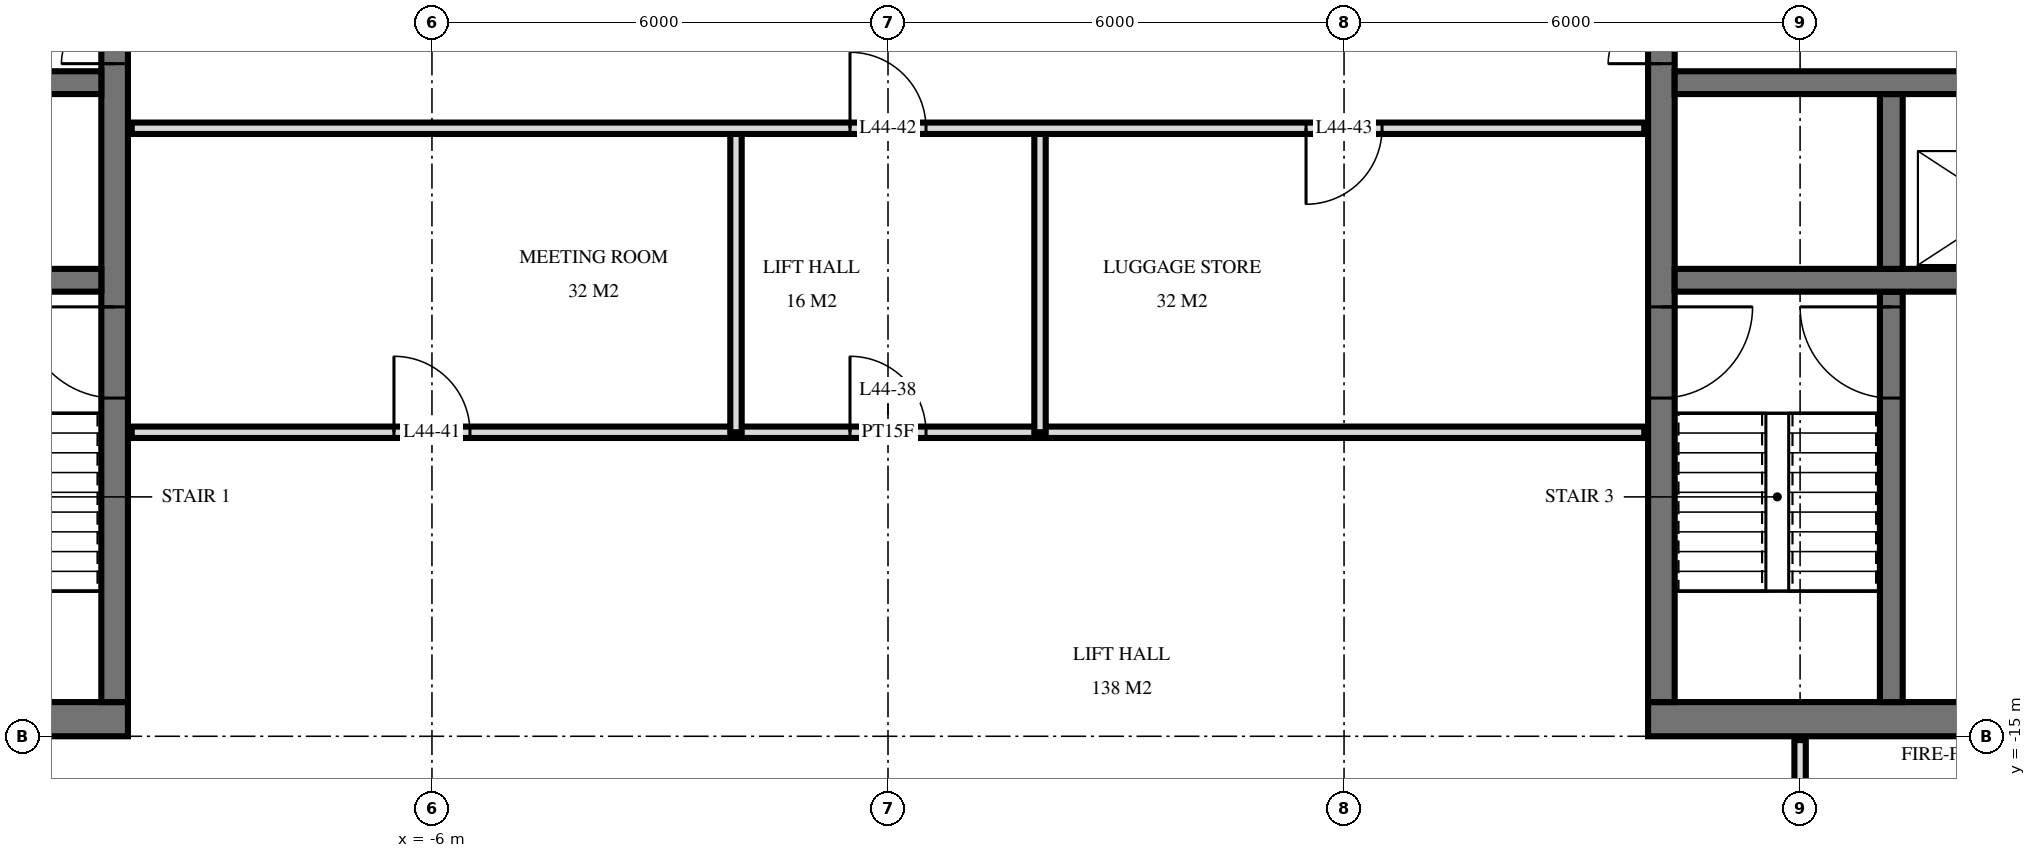
"""IFC4 building model, lengths in metres.
Left out: names, types, materials, properties, quantities, classifications, styles, units other than length and angle.
Written with IfcOpenShell. Run it as: python <this file> out.ifc"""

import sys

from ifc_helpers import new_model, si_unit, direction, frame, frame_2d, origin, place, context, subcontext, project, spatial, rectangle, extrude, element, fill, save


model = new_model("IFC4")
c1 = context("Model", 3, precision=1e-05, world=origin(), true_north=direction((0.0, 1.0)))
c2 = subcontext(c1, "Body", "Model", "MODEL_VIEW")
j1 = project(units=[si_unit("LENGTHUNIT", "METRE"), si_unit("PLANEANGLEUNIT", "RADIAN")], contexts=[c1])
p1 = place(None, origin())
s1 = spatial("IfcSite", under=j1, at=p1, CompositionType="ELEMENT")
p2 = place(p1, origin())
s2 = spatial("IfcBuilding", under=s1, at=p2, CompositionType="ELEMENT")
p3 = place(p2, frame((0.0, 0.0, 170.4)))
s3 = spatial("IfcBuildingStorey", under=s2, at=p3, CompositionType="ELEMENT", Elevation=170.4)
p4 = place(p3, frame((-24.5, -14.775, 0.0), z_axis=(0.0, 0.0, 1.0), x_axis=(1.0, 0.0, 0.0)))
e1 = element("IfcWall", 1, at=p4, inside=s3, PredefinedType="SHEAR", context=c2, shape_type="SweptSolid", body=[
    extrude(rectangle(XDim=14.5, YDim=0.45, at=frame_2d((7.25, 0.0))), origin(), (0.0, 0.0, 1.0), 3.6),
])
p5 = place(p4, frame((6.2, 0.0, 0.0)))
e2 = element("IfcOpeningElement", 2, at=p5, cuts=e1, PredefinedType="OPENING", context=c2, shape_type="SweptSolid", body=[
    extrude(rectangle(XDim=1.2, YDim=2.1, at=frame_2d((0.6, 1.05))), frame((0.0, 0.235, 0.0), z_axis=(0.0, -1.0, 0.0), x_axis=(1.0, 0.0, 0.0)), (0.0, 0.0, 1.0), 0.47),
])
p6 = place(p4, frame((9.25, 0.0, 0.0)))
e3 = element("IfcOpeningElement", 3, at=p6, cuts=e1, PredefinedType="OPENING", context=c2, shape_type="SweptSolid", body=[
    extrude(rectangle(XDim=1.1, YDim=2.1, at=frame_2d((0.55, 1.05))), frame((0.0, 0.235, 0.0), z_axis=(0.0, -1.0, 0.0), x_axis=(1.0, 0.0, 0.0)), (0.0, 0.0, 1.0), 0.47),
])
p7 = place(p4, frame((3.5, 0.0, 0.0)))
e4 = element("IfcOpeningElement", 4, at=p7, cuts=e1, PredefinedType="OPENING", context=c2, shape_type="SweptSolid", body=[
    extrude(rectangle(XDim=0.9, YDim=2.1, at=frame_2d((0.45, 1.05))), frame((0.0, 0.235, 0.0), z_axis=(0.0, -1.0, 0.0), x_axis=(1.0, 0.0, 0.0)), (0.0, 0.0, 1.0), 0.47),
])
p8 = place(p4, frame((1.05, 0.0, 0.0)))
e5 = element("IfcOpeningElement", 5, at=p8, cuts=e1, PredefinedType="OPENING", context=c2, shape_type="SweptSolid", body=[
    extrude(rectangle(XDim=1.0, YDim=2.1, at=frame_2d((0.5, 1.05))), frame((0.0, 0.235, 0.0), z_axis=(0.0, -1.0, 0.0), x_axis=(1.0, 0.0, 0.0)), (0.0, 0.0, 1.0), 0.47),
])
p9 = place(p3, frame((-10.175, -14.55, 0.0), z_axis=(0.0, 0.0, 1.0), x_axis=(0.0, 1.0, 0.0)))
e6 = element("IfcWall", 6, at=p9, inside=s3, PredefinedType="SHEAR", context=c2, shape_type="SweptSolid", body=[
    extrude(rectangle(XDim=14.1, YDim=0.35, at=frame_2d((7.05, 0.0))), origin(), (0.0, 0.0, 1.0), 3.6),
])
p10 = place(p9, frame((8.4, 0.0, 0.0)))
e7 = element("IfcOpeningElement", 7, at=p10, cuts=e6, PredefinedType="OPENING", context=c2, shape_type="SweptSolid", body=[
    extrude(rectangle(XDim=1.4, YDim=2.4, at=frame_2d((0.7, 1.2))), frame((0.0, 0.185, 0.0), z_axis=(0.0, -1.0, 0.0), x_axis=(1.0, 0.0, 0.0)), (0.0, 0.0, 1.0), 0.37),
])
p11 = place(p9, frame((10.0, 0.0, 0.0)))
e8 = element("IfcOpeningElement", 8, at=p11, cuts=e6, PredefinedType="OPENING", context=c2, shape_type="SweptSolid", body=[
    extrude(rectangle(XDim=1.4, YDim=2.4, at=frame_2d((0.7, 1.2))), frame((0.0, 0.185, 0.0), z_axis=(0.0, -1.0, 0.0), x_axis=(1.0, 0.0, 0.0)), (0.0, 0.0, 1.0), 0.37),
])
p12 = place(p9, frame((4.0, 0.0, 0.0)))
e9 = element("IfcOpeningElement", 9, at=p12, cuts=e6, PredefinedType="OPENING", context=c2, shape_type="SweptSolid", body=[
    extrude(rectangle(XDim=1.2, YDim=2.1, at=frame_2d((0.6, 1.05))), frame((0.0, 0.185, 0.0), z_axis=(0.0, -1.0, 0.0), x_axis=(1.0, 0.0, 0.0)), (0.0, 0.0, 1.0), 0.37),
])
p13 = place(p3, frame((-24.05, -6.4, 0.0), z_axis=(0.0, 0.0, 1.0), x_axis=(1.0, 0.0, 0.0)))
e10 = element("IfcWall", 10, at=p13, inside=s3, PredefinedType="SHEAR", context=c2, shape_type="SweptSolid", body=[
    extrude(rectangle(XDim=13.7, YDim=0.3, at=frame_2d((6.85, 0.0))), origin(), (0.0, 0.0, 1.0), 3.6),
])
p14 = place(p13, frame((0.55, 0.0, 0.0)))
e11 = element("IfcOpeningElement", 11, at=p14, cuts=e10, PredefinedType="OPENING", context=c2, shape_type="SweptSolid", body=[
    extrude(rectangle(XDim=1.1, YDim=2.1, at=frame_2d((0.55, 1.05))), frame((0.0, 0.16, 0.0), z_axis=(0.0, -1.0, 0.0), x_axis=(1.0, 0.0, 0.0)), (0.0, 0.0, 1.0), 0.32),
])
p15 = place(p13, frame((5.8, 0.0, 0.0)))
e12 = element("IfcOpeningElement", 12, at=p15, cuts=e10, PredefinedType="OPENING", context=c2, shape_type="SweptSolid", body=[
    extrude(rectangle(XDim=1.1, YDim=2.1, at=frame_2d((0.55, 1.05))), frame((0.0, 0.16, 0.0), z_axis=(0.0, -1.0, 0.0), x_axis=(1.0, 0.0, 0.0)), (0.0, 0.0, 1.0), 0.32),
])
p16 = place(p3, frame((-24.05, -9.0, 0.0), z_axis=(0.0, 0.0, 1.0), x_axis=(1.0, 0.0, 0.0)))
e13 = element("IfcWall", 13, at=p16, inside=s3, PredefinedType="SHEAR", context=c2, shape_type="SweptSolid", body=[
    extrude(rectangle(XDim=13.7, YDim=0.3, at=frame_2d((6.85, 0.0))), origin(), (0.0, 0.0, 1.0), 3.6),
])
p17 = place(p16, frame((8.8, 0.0, 0.0)))
e14 = element("IfcOpeningElement", 14, at=p17, cuts=e13, PredefinedType="OPENING", context=c2, shape_type="SweptSolid", body=[
    extrude(rectangle(XDim=1.1, YDim=2.1, at=frame_2d((0.55, 1.05))), frame((0.0, 0.16, 0.0), z_axis=(0.0, -1.0, 0.0), x_axis=(1.0, 0.0, 0.0)), (0.0, 0.0, 1.0), 0.32),
])
p18 = place(p3, frame((10.0, -14.775, 0.0), z_axis=(0.0, 0.0, 1.0), x_axis=(1.0, 0.0, 0.0)))
e15 = element("IfcWall", 15, at=p18, inside=s3, PredefinedType="SHEAR", context=c2, shape_type="SweptSolid", body=[
    extrude(rectangle(XDim=14.5, YDim=0.45, at=frame_2d((7.25, 0.0))), origin(), (0.0, 0.0, 1.0), 3.6),
])
p19 = place(p18, frame((7.1, 0.0, 0.0)))
e16 = element("IfcOpeningElement", 16, at=p19, cuts=e15, PredefinedType="OPENING", context=c2, shape_type="SweptSolid", body=[
    extrude(rectangle(XDim=1.2, YDim=2.1, at=frame_2d((0.6, 1.05))), frame((0.0, 0.235, 0.0), z_axis=(0.0, -1.0, 0.0), x_axis=(1.0, 0.0, 0.0)), (0.0, 0.0, 1.0), 0.47),
])
p20 = place(p18, frame((4.15, 0.0, 0.0)))
e17 = element("IfcOpeningElement", 17, at=p20, cuts=e15, PredefinedType="OPENING", context=c2, shape_type="SweptSolid", body=[
    extrude(rectangle(XDim=1.1, YDim=2.1, at=frame_2d((0.55, 1.05))), frame((0.0, 0.235, 0.0), z_axis=(0.0, -1.0, 0.0), x_axis=(1.0, 0.0, 0.0)), (0.0, 0.0, 1.0), 0.47),
])
p21 = place(p18, frame((10.1, 0.0, 0.0)))
e18 = element("IfcOpeningElement", 18, at=p21, cuts=e15, PredefinedType="OPENING", context=c2, shape_type="SweptSolid", body=[
    extrude(rectangle(XDim=0.9, YDim=2.1, at=frame_2d((0.45, 1.05))), frame((0.0, 0.235, 0.0), z_axis=(0.0, -1.0, 0.0), x_axis=(1.0, 0.0, 0.0)), (0.0, 0.0, 1.0), 0.47),
])
p22 = place(p18, frame((12.45, 0.0, 0.0)))
e19 = element("IfcOpeningElement", 19, at=p22, cuts=e15, PredefinedType="OPENING", context=c2, shape_type="SweptSolid", body=[
    extrude(rectangle(XDim=1.0, YDim=2.1, at=frame_2d((0.5, 1.05))), frame((0.0, 0.235, 0.0), z_axis=(0.0, -1.0, 0.0), x_axis=(1.0, 0.0, 0.0)), (0.0, 0.0, 1.0), 0.47),
])
p23 = place(p3, frame((10.175, -14.55, 0.0), z_axis=(0.0, 0.0, 1.0), x_axis=(0.0, 1.0, 0.0)))
e20 = element("IfcWall", 20, at=p23, inside=s3, PredefinedType="SHEAR", context=c2, shape_type="SweptSolid", body=[
    extrude(rectangle(XDim=14.1, YDim=0.35, at=frame_2d((7.05, 0.0))), origin(), (0.0, 0.0, 1.0), 3.6),
])
p24 = place(p23, frame((8.4, 0.0, 0.0)))
e21 = element("IfcOpeningElement", 21, at=p24, cuts=e20, PredefinedType="OPENING", context=c2, shape_type="SweptSolid", body=[
    extrude(rectangle(XDim=1.4, YDim=2.4, at=frame_2d((0.7, 1.2))), frame((0.0, 0.185, 0.0), z_axis=(0.0, -1.0, 0.0), x_axis=(1.0, 0.0, 0.0)), (0.0, 0.0, 1.0), 0.37),
])
p25 = place(p23, frame((10.0, 0.0, 0.0)))
e22 = element("IfcOpeningElement", 22, at=p25, cuts=e20, PredefinedType="OPENING", context=c2, shape_type="SweptSolid", body=[
    extrude(rectangle(XDim=1.4, YDim=2.4, at=frame_2d((0.7, 1.2))), frame((0.0, 0.185, 0.0), z_axis=(0.0, -1.0, 0.0), x_axis=(1.0, 0.0, 0.0)), (0.0, 0.0, 1.0), 0.37),
])
p26 = place(p23, frame((4.0, 0.0, 0.0)))
e23 = element("IfcOpeningElement", 23, at=p26, cuts=e20, PredefinedType="OPENING", context=c2, shape_type="SweptSolid", body=[
    extrude(rectangle(XDim=1.2, YDim=2.1, at=frame_2d((0.6, 1.05))), frame((0.0, 0.185, 0.0), z_axis=(0.0, -1.0, 0.0), x_axis=(1.0, 0.0, 0.0)), (0.0, 0.0, 1.0), 0.37),
])
p27 = place(p3, frame((10.35, -6.4, 0.0), z_axis=(0.0, 0.0, 1.0), x_axis=(1.0, 0.0, 0.0)))
e24 = element("IfcWall", 24, at=p27, inside=s3, PredefinedType="SHEAR", context=c2, shape_type="SweptSolid", body=[
    extrude(rectangle(XDim=13.7, YDim=0.3, at=frame_2d((6.85, 0.0))), origin(), (0.0, 0.0, 1.0), 3.6),
])
p28 = place(p27, frame((12.05, 0.0, 0.0)))
e25 = element("IfcOpeningElement", 25, at=p28, cuts=e24, PredefinedType="OPENING", context=c2, shape_type="SweptSolid", body=[
    extrude(rectangle(XDim=1.1, YDim=2.1, at=frame_2d((0.55, 1.05))), frame((0.0, 0.16, 0.0), z_axis=(0.0, -1.0, 0.0), x_axis=(1.0, 0.0, 0.0)), (0.0, 0.0, 1.0), 0.32),
])
p29 = place(p27, frame((6.8, 0.0, 0.0)))
e26 = element("IfcOpeningElement", 26, at=p29, cuts=e24, PredefinedType="OPENING", context=c2, shape_type="SweptSolid", body=[
    extrude(rectangle(XDim=1.1, YDim=2.1, at=frame_2d((0.55, 1.05))), frame((0.0, 0.16, 0.0), z_axis=(0.0, -1.0, 0.0), x_axis=(1.0, 0.0, 0.0)), (0.0, 0.0, 1.0), 0.32),
])
p30 = place(p3, frame((10.35, -9.0, 0.0), z_axis=(0.0, 0.0, 1.0), x_axis=(1.0, 0.0, 0.0)))
e27 = element("IfcWall", 27, at=p30, inside=s3, PredefinedType="SHEAR", context=c2, shape_type="SweptSolid", body=[
    extrude(rectangle(XDim=13.7, YDim=0.3, at=frame_2d((6.85, 0.0))), origin(), (0.0, 0.0, 1.0), 3.6),
])
p31 = place(p30, frame((3.8, 0.0, 0.0)))
e28 = element("IfcOpeningElement", 28, at=p31, cuts=e27, PredefinedType="OPENING", context=c2, shape_type="SweptSolid", body=[
    extrude(rectangle(XDim=1.1, YDim=2.1, at=frame_2d((0.55, 1.05))), frame((0.0, 0.16, 0.0), z_axis=(0.0, -1.0, 0.0), x_axis=(1.0, 0.0, 0.0)), (0.0, 0.0, 1.0), 0.32),
])
p32 = place(p3, frame((13.2, -8.85, 0.0), z_axis=(0.0, 0.0, 1.0), x_axis=(0.0, 1.0, 0.0)))
e29 = element("IfcWall", 29, at=p32, inside=s3, PredefinedType="SHEAR", context=c2, shape_type="SweptSolid", body=[
    extrude(rectangle(XDim=2.3, YDim=0.3, at=frame_2d((1.15, 0.0))), origin(), (0.0, 0.0, 1.0), 3.6),
])
p33 = place(p3, frame((13.2, -14.55, 0.0), z_axis=(0.0, 0.0, 1.0), x_axis=(0.0, 1.0, 0.0)))
e30 = element("IfcWall", 30, at=p33, inside=s3, PredefinedType="SHEAR", context=c2, shape_type="SweptSolid", body=[
    extrude(rectangle(XDim=5.4, YDim=0.3, at=frame_2d((2.7, 0.0))), origin(), (0.0, 0.0, 1.0), 3.6),
])
p34 = place(p33, frame((4.0, 0.0, 0.0)))
e31 = element("IfcOpeningElement", 31, at=p34, cuts=e30, PredefinedType="OPENING", context=c2, shape_type="SweptSolid", body=[
    extrude(rectangle(XDim=1.2, YDim=2.1, at=frame_2d((0.6, 1.05))), frame((0.0, 0.16, 0.0), z_axis=(0.0, -1.0, 0.0), x_axis=(1.0, 0.0, 0.0)), (0.0, 0.0, 1.0), 0.32),
])
p35 = place(p3, frame((12.0, -17.4, 0.0), z_axis=(0.0, 0.0, 1.0), x_axis=(0.0, 1.0, 0.0)))
e32 = element("IfcWall", 32, at=p35, inside=s3, PredefinedType="PARTITIONING", context=c2, shape_type="SweptSolid", body=[
    extrude(rectangle(XDim=2.35, YDim=0.15, at=frame_2d((1.175, 0.0))), origin(), (0.0, 0.0, 1.0), 3.32),
])
p36 = place(p35, frame((0.7, 0.0, 0.0)))
e33 = element("IfcOpeningElement", 33, at=p36, cuts=e32, PredefinedType="OPENING", context=c2, shape_type="SweptSolid", body=[
    extrude(rectangle(XDim=1.0, YDim=2.1, at=frame_2d((0.5, 1.05))), frame((0.0, 0.085, 0.0), z_axis=(0.0, -1.0, 0.0), x_axis=(1.0, 0.0, 0.0)), (0.0, 0.0, 1.0), 0.17),
])
for number, where, z_axis, x_axis in (
    (34, (2.0, -11.0, 0.0), (0.0, 0.0, 1.0), (0.0, 1.0, 0.0)),
    (35, (-2.0, -11.0, 0.0), (0.0, 0.0, 1.0), (0.0, 1.0, 0.0)),
):
    element("IfcWall", number, at=place(p3, frame(where, z_axis=z_axis, x_axis=x_axis)), inside=s3, PredefinedType="PARTITIONING", context=c2, shape_type="SweptSolid", body=[
        extrude(rectangle(XDim=4.0, YDim=0.15, at=frame_2d((2.0, 0.0))), origin(), (0.0, 0.0, 1.0), 3.32),
    ])
p37 = place(p3, frame((-9.95, -11.0, 0.0), z_axis=(0.0, 0.0, 1.0), x_axis=(1.0, 0.0, 0.0)))
e36 = element("IfcWall", 36, at=p37, inside=s3, PredefinedType="PARTITIONING", context=c2, shape_type="SweptSolid", body=[
    extrude(rectangle(XDim=19.9, YDim=0.15, at=frame_2d((9.95, 0.0))), origin(), (0.0, 0.0, 1.0), 3.32),
])
p38 = place(p37, frame((9.45, 0.0, 0.0)))
e37 = element("IfcOpeningElement", 37, at=p38, cuts=e36, PredefinedType="OPENING", context=c2, shape_type="SweptSolid", body=[
    extrude(rectangle(XDim=1.0, YDim=2.1, at=frame_2d((0.5, 1.05))), frame((0.0, 0.085, 0.0), z_axis=(0.0, -1.0, 0.0), x_axis=(1.0, 0.0, 0.0)), (0.0, 0.0, 1.0), 0.17),
])
p39 = place(p37, frame((3.45, 0.0, 0.0)))
e38 = element("IfcOpeningElement", 38, at=p39, cuts=e36, PredefinedType="OPENING", context=c2, shape_type="SweptSolid", body=[
    extrude(rectangle(XDim=1.0, YDim=2.1, at=frame_2d((0.5, 1.05))), frame((0.0, 0.085, 0.0), z_axis=(0.0, -1.0, 0.0), x_axis=(1.0, 0.0, 0.0)), (0.0, 0.0, 1.0), 0.17),
])
p40 = place(p3, frame((-9.95, -7.0, 0.0), z_axis=(0.0, 0.0, 1.0), x_axis=(1.0, 0.0, 0.0)))
e39 = element("IfcWall", 39, at=p40, inside=s3, PredefinedType="PARTITIONING", context=c2, shape_type="SweptSolid", body=[
    extrude(rectangle(XDim=19.9, YDim=0.15, at=frame_2d((9.95, 0.0))), origin(), (0.0, 0.0, 1.0), 3.32),
])
p41 = place(p40, frame((9.45, 0.0, 0.0)))
e40 = element("IfcOpeningElement", 40, at=p41, cuts=e39, PredefinedType="OPENING", context=c2, shape_type="SweptSolid", body=[
    extrude(rectangle(XDim=1.0, YDim=2.1, at=frame_2d((0.5, 1.05))), frame((0.0, 0.085, 0.0), z_axis=(0.0, -1.0, 0.0), x_axis=(1.0, 0.0, 0.0)), (0.0, 0.0, 1.0), 0.17),
])
p42 = place(p40, frame((15.45, 0.0, 0.0)))
e41 = element("IfcOpeningElement", 41, at=p42, cuts=e39, PredefinedType="OPENING", context=c2, shape_type="SweptSolid", body=[
    extrude(rectangle(XDim=1.0, YDim=2.1, at=frame_2d((0.5, 1.05))), frame((0.0, 0.085, 0.0), z_axis=(0.0, -1.0, 0.0), x_axis=(1.0, 0.0, 0.0)), (0.0, 0.0, 1.0), 0.17),
])
p43 = place(p10, origin())
e42 = element("IfcDoor", 42, at=p43, inside=s3, OperationType="DOUBLE_DOOR_SINGLE_SWING", PredefinedType="DOOR", context=c2, shape_type="SweptSolid", body=[
    extrude(rectangle(XDim=1.4, YDim=2.4, at=frame_2d((0.7, 1.2))), frame((0.0, 0.025, 0.0), z_axis=(0.0, -1.0, 0.0), x_axis=(1.0, 0.0, 0.0)), (0.0, 0.0, 1.0), 0.05),
])
fill(e7, e42)
p44 = place(p12, origin())
e43 = element("IfcDoor", 43, at=p44, inside=s3, OperationType="SINGLE_SWING_LEFT", PredefinedType="DOOR", context=c2, shape_type="SweptSolid", body=[
    extrude(rectangle(XDim=1.2, YDim=2.1, at=frame_2d((0.6, 1.05))), frame((0.0, 0.025, 0.0), z_axis=(0.0, -1.0, 0.0), x_axis=(1.0, 0.0, 0.0)), (0.0, 0.0, 1.0), 0.05),
])
fill(e9, e43)
p45 = place(p24, origin())
e44 = element("IfcDoor", 44, at=p45, inside=s3, OperationType="DOUBLE_DOOR_SINGLE_SWING", PredefinedType="DOOR", context=c2, shape_type="SweptSolid", body=[
    extrude(rectangle(XDim=1.4, YDim=2.4, at=frame_2d((0.7, 1.2))), frame((0.0, 0.025, 0.0), z_axis=(0.0, -1.0, 0.0), x_axis=(1.0, 0.0, 0.0)), (0.0, 0.0, 1.0), 0.05),
])
fill(e21, e44)
p46 = place(p26, frame((0.6, 0.0, 0.0), z_axis=(0.0, 0.0, 1.0), x_axis=(-1.0, 0.0, 0.0)))
e45 = element("IfcDoor", 45, at=p46, inside=s3, OperationType="SINGLE_SWING_RIGHT", PredefinedType="DOOR", context=c2, shape_type="SweptSolid", body=[
    extrude(rectangle(XDim=1.2, YDim=2.1, at=frame_2d((0.0, 1.05))), frame((0.0, -0.025, 0.0), z_axis=(0.0, 1.0, 0.0), x_axis=(-1.0, 0.0, 0.0)), (0.0, 0.0, 1.0), 0.05),
])
fill(e23, e45)
p47 = place(p34, origin())
e46 = element("IfcDoor", 46, at=p47, inside=s3, OperationType="SINGLE_SWING_LEFT", PredefinedType="DOOR", context=c2, shape_type="SweptSolid", body=[
    extrude(rectangle(XDim=1.2, YDim=2.1, at=frame_2d((0.6, 1.05))), frame((0.0, 0.025, 0.0), z_axis=(0.0, -1.0, 0.0), x_axis=(1.0, 0.0, 0.0)), (0.0, 0.0, 1.0), 0.05),
])
fill(e31, e46)
p48 = place(p38, origin())
e47 = element("IfcDoor", 47, at=p48, inside=s3, OperationType="SINGLE_SWING_RIGHT", PredefinedType="DOOR", context=c2, shape_type="SweptSolid", body=[
    extrude(rectangle(XDim=1.0, YDim=2.1, at=frame_2d((0.5, 1.05))), frame((0.0, 0.025, 0.0), z_axis=(0.0, -1.0, 0.0), x_axis=(1.0, 0.0, 0.0)), (0.0, 0.0, 1.0), 0.05),
])
fill(e37, e47)
p49 = place(p39, origin())
e48 = element("IfcDoor", 48, at=p49, inside=s3, OperationType="SINGLE_SWING_RIGHT", PredefinedType="DOOR", context=c2, shape_type="SweptSolid", body=[
    extrude(rectangle(XDim=1.0, YDim=2.1, at=frame_2d((0.5, 1.05))), frame((0.0, 0.025, 0.0), z_axis=(0.0, -1.0, 0.0), x_axis=(1.0, 0.0, 0.0)), (0.0, 0.0, 1.0), 0.05),
])
fill(e38, e48)
p50 = place(p41, origin())
e49 = element("IfcDoor", 49, at=p50, inside=s3, OperationType="SINGLE_SWING_RIGHT", PredefinedType="DOOR", context=c2, shape_type="SweptSolid", body=[
    extrude(rectangle(XDim=1.0, YDim=2.1, at=frame_2d((0.5, 1.05))), frame((0.0, 0.025, 0.0), z_axis=(0.0, -1.0, 0.0), x_axis=(1.0, 0.0, 0.0)), (0.0, 0.0, 1.0), 0.05),
])
fill(e40, e49)
p51 = place(p42, frame((0.5, 0.0, 0.0), z_axis=(0.0, 0.0, 1.0), x_axis=(-1.0, 0.0, 0.0)))
e50 = element("IfcDoor", 50, at=p51, inside=s3, OperationType="SINGLE_SWING_LEFT", PredefinedType="DOOR", context=c2, shape_type="SweptSolid", body=[
    extrude(rectangle(XDim=1.0, YDim=2.1, at=frame_2d((0.0, 1.05))), frame((0.0, -0.025, 0.0), z_axis=(0.0, 1.0, 0.0), x_axis=(-1.0, 0.0, 0.0)), (0.0, 0.0, 1.0), 0.05),
])
fill(e41, e50)
save(model, sys.argv[1])
